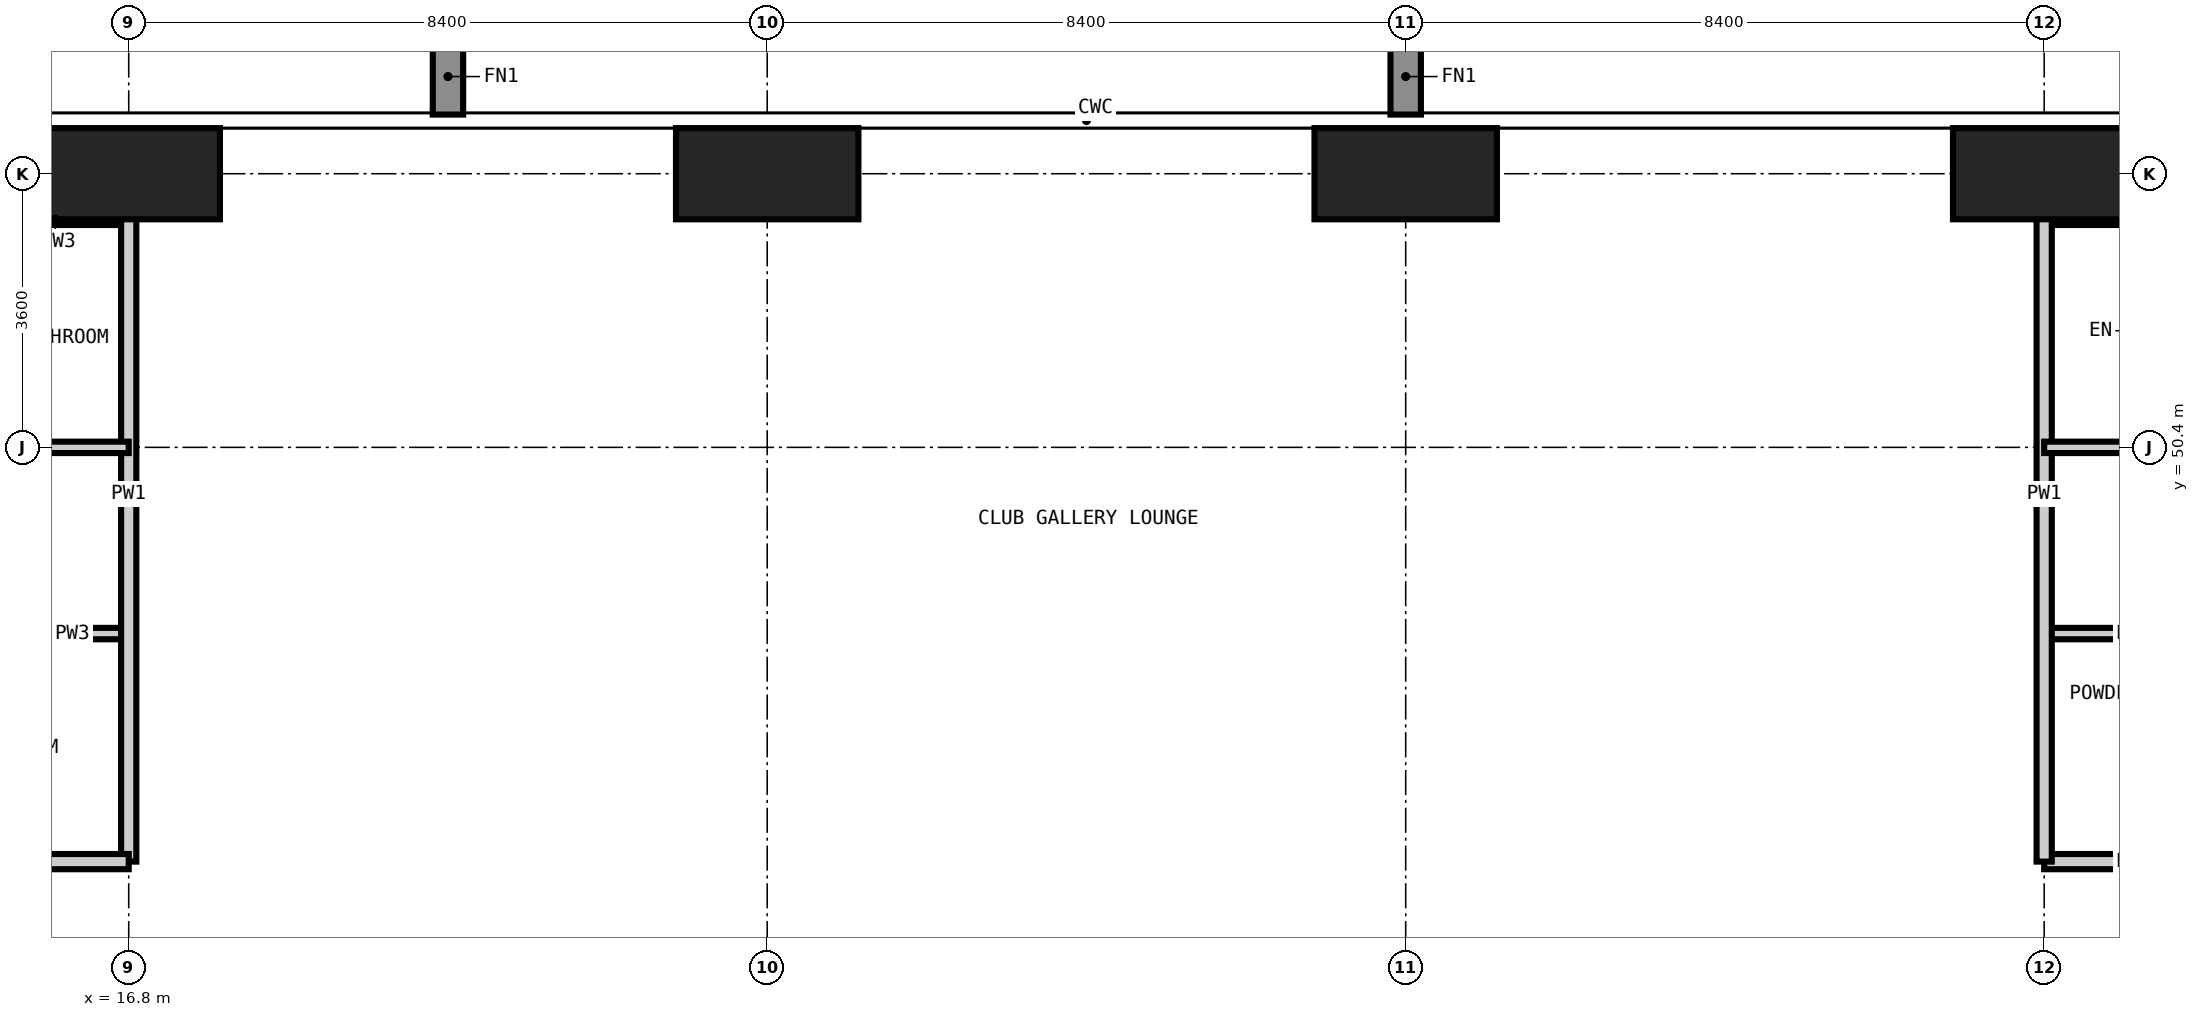
"""IFC4 building model, lengths in metres.
Left out: names, types, materials, properties, quantities, classifications, styles, units other than length and angle.
Written with IfcOpenShell. Run it as: python <this file> out.ifc"""

import sys

from ifc_helpers import new_model, si_unit, direction, frame, frame_2d, origin, origin_2d, place, context, subcontext, project, spatial, rectangle, extrude, element, save


model = new_model("IFC4")
c1 = context("Model", 3, precision=1e-05, world=origin(), true_north=direction((0.0, 1.0)))
c2 = subcontext(c1, "Body", "Model", "MODEL_VIEW")
j1 = project(units=[si_unit("LENGTHUNIT", "METRE"), si_unit("PLANEANGLEUNIT", "RADIAN")], contexts=[c1])
p1 = place(None, origin())
s1 = spatial("IfcSite", under=j1, at=p1, CompositionType="ELEMENT")
p2 = place(p1, origin())
s2 = spatial("IfcBuilding", under=s1, at=p2, CompositionType="ELEMENT")
p3 = place(p2, frame((0.0, 0.0, 166.2)))
s3 = spatial("IfcBuildingStorey", under=s2, at=p3, CompositionType="ELEMENT", Elevation=166.2)
for number, where, z_axis, x_axis in (
    (1, (16.8, 54.0, -0.35), (0.0, 0.0, 1.0), (1.0, 0.0, 0.0)),
    (2, (25.2, 54.0, -0.35), (0.0, 0.0, 1.0), (1.0, 0.0, 0.0)),
    (3, (33.6, 54.0, -0.35), (0.0, 0.0, 1.0), (1.0, 0.0, 0.0)),
    (4, (42.0, 54.0, -0.35), (0.0, 0.0, 1.0), (1.0, 0.0, 0.0)),
):
    element("IfcColumn", number, at=place(p3, frame(where, z_axis=z_axis, x_axis=x_axis)), inside=s3, PredefinedType="COLUMN", context=c2, shape_type="SweptSolid", body=[
        extrude(rectangle(XDim=2.4, YDim=1.2, at=origin_2d()), origin(), (0.0, 0.0, 1.0), 3.6),
    ])
p4 = place(p3, frame((13.25, 47.95, 0.0), z_axis=(0.0, 0.0, 1.0), x_axis=(1.0, 0.0, 0.0)))
e5 = element("IfcWall", 5, at=p4, inside=s3, PredefinedType="PARTITIONING", context=c2, shape_type="SweptSolid", body=[
    extrude(rectangle(XDim=3.55, YDim=0.15, at=frame_2d((1.775, 0.0))), origin(), (0.0, 0.0, 1.0), 3.25),
])
p5 = place(p4, frame((1.35, 0.0, 0.0)))
e6 = element("IfcOpeningElement", 6, at=p5, cuts=e5, PredefinedType="OPENING", context=c2, shape_type="SweptSolid", body=[
    extrude(rectangle(XDim=0.85, YDim=2.1, at=frame_2d((0.425, 1.05))), frame((0.0, 0.085, 0.0), z_axis=(0.0, -1.0, 0.0), x_axis=(1.0, 0.0, 0.0)), (0.0, 0.0, 1.0), 0.17),
])
p6 = place(p3, frame((42.0, 47.95, 0.0), z_axis=(0.0, 0.0, 1.0), x_axis=(1.0, 0.0, 0.0)))
e7 = element("IfcWall", 7, at=p6, inside=s3, PredefinedType="PARTITIONING", context=c2, shape_type="SweptSolid", body=[
    extrude(rectangle(XDim=2.35, YDim=0.15, at=frame_2d((1.175, 0.0))), origin(), (0.0, 0.0, 1.0), 3.25),
])
p7 = place(p3, frame((13.2, 53.4, 0.0), z_axis=(0.0, 0.0, 1.0), x_axis=(1.0, 0.0, 0.0)))
e8 = element("IfcWall", 8, at=p7, inside=s3, PredefinedType="PARTITIONING", context=c2, shape_type="SweptSolid", body=[
    extrude(rectangle(XDim=3.6, YDim=0.15, at=frame_2d((1.8, 0.0))), origin(), (0.0, 0.0, 1.0), 3.25),
])
p8 = place(p7, frame((1.375, 0.0, 0.0)))
e9 = element("IfcOpeningElement", 9, at=p8, cuts=e8, PredefinedType="OPENING", context=c2, shape_type="SweptSolid", body=[
    extrude(rectangle(XDim=0.85, YDim=2.1, at=frame_2d((0.425, 1.05))), frame((0.0, 0.085, 0.0), z_axis=(0.0, -1.0, 0.0), x_axis=(1.0, 0.0, 0.0)), (0.0, 0.0, 1.0), 0.17),
])
p9 = place(p3, frame((42.0, 53.4, 0.0), z_axis=(0.0, 0.0, 1.0), x_axis=(1.0, 0.0, 0.0)))
e10 = element("IfcWall", 10, at=p9, inside=s3, PredefinedType="PARTITIONING", context=c2, shape_type="SweptSolid", body=[
    extrude(rectangle(XDim=3.6, YDim=0.15, at=frame_2d((1.8, 0.0))), origin(), (0.0, 0.0, 1.0), 3.25),
])
p10 = place(p9, frame((1.375, 0.0, 0.0)))
e11 = element("IfcOpeningElement", 11, at=p10, cuts=e10, PredefinedType="OPENING", context=c2, shape_type="SweptSolid", body=[
    extrude(rectangle(XDim=0.85, YDim=2.1, at=frame_2d((0.425, 1.05))), frame((0.0, 0.085, 0.0), z_axis=(0.0, -1.0, 0.0), x_axis=(1.0, 0.0, 0.0)), (0.0, 0.0, 1.0), 0.17),
])
p11 = place(p3, frame((16.8, 44.95, 0.0), z_axis=(0.0, 0.0, 1.0), x_axis=(0.0, 1.0, 0.0)))
e12 = element("IfcWall", 12, at=p11, inside=s3, PredefinedType="PARTITIONING", context=c2, shape_type="SweptSolid", body=[
    extrude(rectangle(XDim=9.668, YDim=0.2, at=frame_2d((4.834, 0.0))), origin(), (0.0, 0.0, 1.0), 3.25),
])
p12 = place(p3, frame((13.25, 44.95, 0.0), z_axis=(0.0, 0.0, 1.0), x_axis=(1.0, 0.0, 0.0)))
e13 = element("IfcWall", 13, at=p12, inside=s3, PredefinedType="PARTITIONING", context=c2, shape_type="SweptSolid", body=[
    extrude(rectangle(XDim=3.55, YDim=0.2, at=frame_2d((1.775, 0.0))), origin(), (0.0, 0.0, 1.0), 3.25),
])
p13 = place(p3, frame((42.0, 44.95, 0.0), z_axis=(0.0, 0.0, 1.0), x_axis=(1.0, 0.0, 0.0)))
e14 = element("IfcWall", 14, at=p13, inside=s3, PredefinedType="PARTITIONING", context=c2, shape_type="SweptSolid", body=[
    extrude(rectangle(XDim=2.35, YDim=0.2, at=frame_2d((1.175, 0.0))), origin(), (0.0, 0.0, 1.0), 3.25),
])
p14 = place(p3, frame((42.0, 54.618, 0.0), z_axis=(0.0, 0.0, 1.0), x_axis=(0.0, -1.0, 0.0)))
e15 = element("IfcWall", 15, at=p14, inside=s3, PredefinedType="PARTITIONING", context=c2, shape_type="SweptSolid", body=[
    extrude(rectangle(XDim=9.668, YDim=0.2, at=frame_2d((4.834, 0.0))), origin(), (0.0, 0.0, 1.0), 3.25),
])
p15 = place(p3, frame((4.182, 50.4, 0.0), z_axis=(0.0, 0.0, 1.0), x_axis=(1.0, 0.0, 0.0)))
e16 = element("IfcWall", 16, at=p15, inside=s3, PredefinedType="PARTITIONING", context=c2, shape_type="SweptSolid", body=[
    extrude(rectangle(XDim=12.618, YDim=0.15, at=frame_2d((6.309, 0.0))), origin(), (0.0, 0.0, 1.0), 3.25),
])
p16 = place(p15, frame((2.868, 0.0, 0.0)))
e17 = element("IfcOpeningElement", 17, at=p16, cuts=e16, PredefinedType="OPENING", context=c2, shape_type="SweptSolid", body=[
    extrude(rectangle(XDim=0.9, YDim=2.1, at=frame_2d((0.45, 1.05))), frame((0.0, 0.085, 0.0), z_axis=(0.0, -1.0, 0.0), x_axis=(1.0, 0.0, 0.0)), (0.0, 0.0, 1.0), 0.17),
])
p17 = place(p3, frame((42.0, 50.4, 0.0), z_axis=(0.0, 0.0, 1.0), x_axis=(1.0, 0.0, 0.0)))
e18 = element("IfcWall", 18, at=p17, inside=s3, PredefinedType="PARTITIONING", context=c2, shape_type="SweptSolid", body=[
    extrude(rectangle(XDim=12.618, YDim=0.15, at=frame_2d((6.309, 0.0))), origin(), (0.0, 0.0, 1.0), 3.25),
])
p18 = place(p17, frame((8.85, 0.0, 0.0)))
e19 = element("IfcOpeningElement", 19, at=p18, cuts=e18, PredefinedType="OPENING", context=c2, shape_type="SweptSolid", body=[
    extrude(rectangle(XDim=0.9, YDim=2.1, at=frame_2d((0.45, 1.05))), frame((0.0, 0.085, 0.0), z_axis=(0.0, -1.0, 0.0), x_axis=(1.0, 0.0, 0.0)), (0.0, 0.0, 1.0), 0.17),
])
save(model, sys.argv[1])
